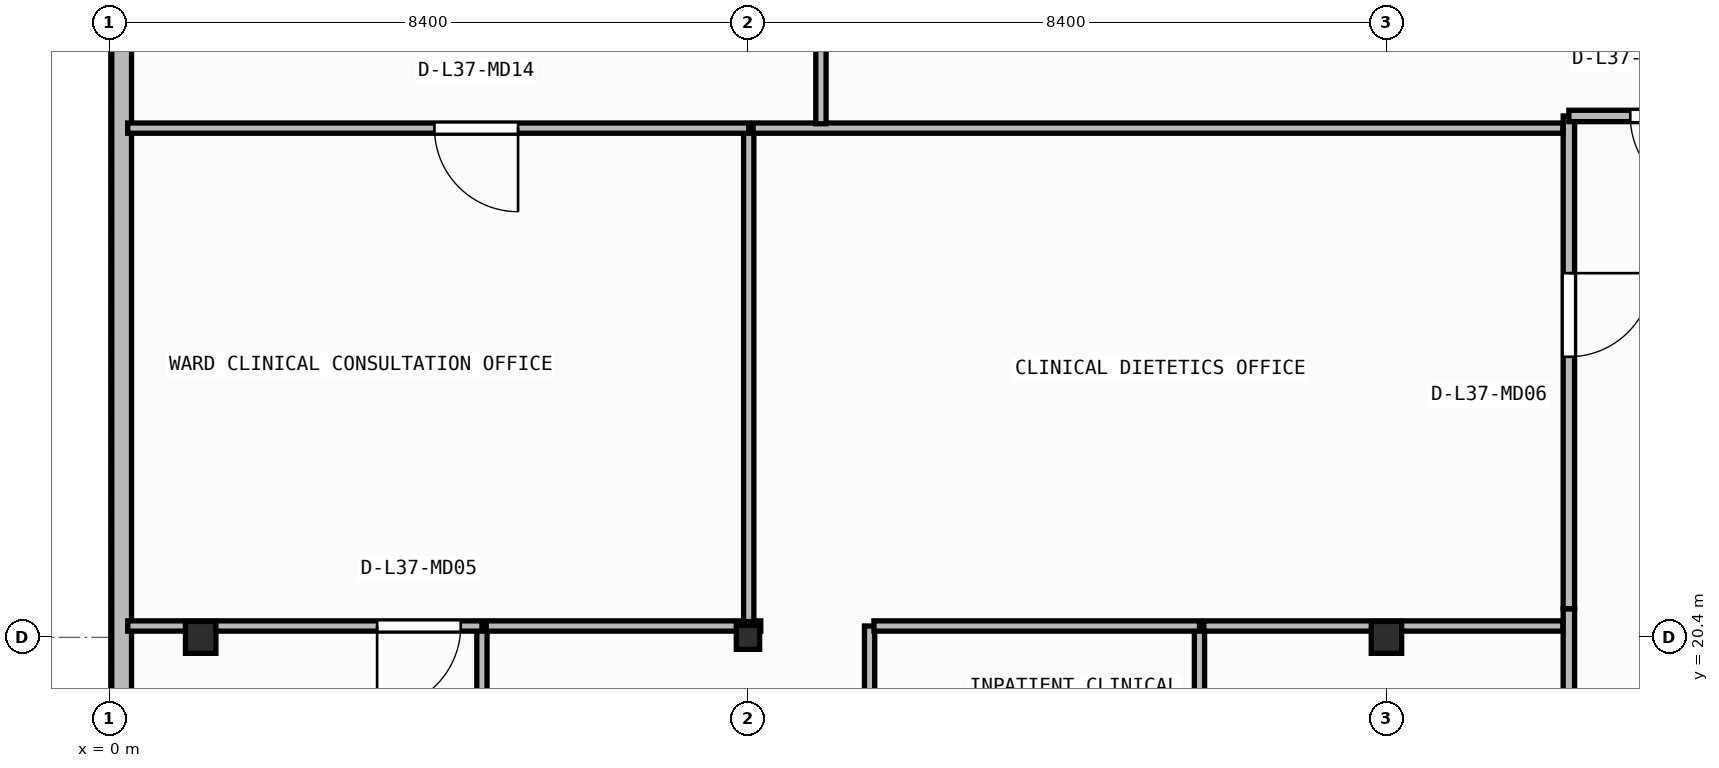
"""IFC4 building model, lengths in metres.
Left out: names, types, materials, properties, quantities, classifications, styles, units other than length and angle.
Written with IfcOpenShell. Run it as: python <this file> out.ifc"""

import sys

from ifc_helpers import new_model, si_unit, direction, frame, frame_2d, origin, origin_2d, place, context, subcontext, project, spatial, rectangle, i_section, extrude, element, fill, save


model = new_model("IFC4")
c1 = context("Model", 3, precision=1e-05, world=origin(), true_north=direction((0.0, 1.0)))
c2 = subcontext(c1, "Body", "Model", "MODEL_VIEW")
j1 = project(units=[si_unit("LENGTHUNIT", "METRE"), si_unit("PLANEANGLEUNIT", "RADIAN")], contexts=[c1])
p1 = place(None, origin())
s1 = spatial("IfcSite", under=j1, at=p1, CompositionType="ELEMENT")
p2 = place(p1, origin())
s2 = spatial("IfcBuilding", under=s1, at=p2, CompositionType="ELEMENT")
p3 = place(p2, frame((0.0, 0.0, 150.75)))
s3 = spatial("IfcBuildingStorey", under=s2, at=p3, CompositionType="ELEMENT", Elevation=150.75)
p4 = place(p3, frame((1.2, 20.4, 0.0), z_axis=(0.0, 0.0, 1.0), x_axis=(1.0, 0.0, 0.0)))
e1 = element("IfcColumn", 1, at=p4, inside=s3, PredefinedType="COLUMN", context=c2, shape_type="SweptSolid", body=[
    extrude(i_section(OverallWidth=0.4, OverallDepth=0.42, WebThickness=0.025, FlangeThickness=0.04, at=origin_2d()), origin(), (0.0, 0.0, 1.0), 3.95),
])
p5 = place(p3, frame((8.4, 20.4, 0.0), z_axis=(0.0, 0.0, 1.0), x_axis=(1.0, 0.0, 0.0)))
e2 = element("IfcColumn", 2, at=p5, inside=s3, PredefinedType="COLUMN", context=c2, shape_type="SweptSolid", body=[
    extrude(i_section(OverallWidth=0.307, OverallDepth=0.315, WebThickness=0.012, FlangeThickness=0.019, FilletRadius=0.017, at=origin_2d()), origin(), (0.0, 0.0, 1.0), 3.95),
])
p6 = place(p3, frame((16.8, 20.4, 0.0), z_axis=(0.0, 0.0, 1.0), x_axis=(1.0, 0.0, 0.0)))
e3 = element("IfcColumn", 3, at=p6, inside=s3, PredefinedType="COLUMN", context=c2, shape_type="SweptSolid", body=[
    extrude(i_section(OverallWidth=0.4, OverallDepth=0.42, WebThickness=0.025, FlangeThickness=0.04, at=origin_2d()), origin(), (0.0, 0.0, 1.0), 3.95),
])
p7 = place(p3, frame((0.16, 40.64, 0.0), z_axis=(0.0, 0.0, 1.0), x_axis=(0.0, -1.0, 0.0)))
e4 = element("IfcWall", 4, at=p7, inside=s3, PredefinedType="STANDARD", context=c2, shape_type="SweptSolid", body=[
    extrude(rectangle(XDim=37.88, YDim=0.26, at=frame_2d((18.94, 0.0))), origin(), (0.0, 0.0, 1.0), 3.71),
])
p8 = place(p7, frame((27.795, 0.0, 0.9)))
e5 = element("IfcOpeningElement", 5, at=p8, cuts=e4, PredefinedType="OPENING", context=c2, shape_type="SweptSolid", body=[
    extrude(rectangle(XDim=2.4, YDim=1.65, at=frame_2d((1.2, 0.825))), frame((0.0, 0.14, 0.0), z_axis=(0.0, -1.0, 0.0), x_axis=(1.0, 0.0, 0.0)), (0.0, 0.0, 1.0), 0.28),
])
p9 = place(p3, frame((19.2, 20.776, 0.0), z_axis=(0.0, 0.0, 1.0), x_axis=(0.0, -1.0, 0.0)))
e6 = element("IfcWall", 6, at=p9, inside=s3, PredefinedType="PARTITIONING", context=c2, shape_type="SweptSolid", body=[
    extrude(rectangle(XDim=6.076, YDim=0.15, at=frame_2d((3.038, 0.0))), origin(), (0.0, 0.0, 1.0), 3.71),
])
p10 = place(p3, frame((19.2, 27.26, 0.0), z_axis=(0.0, 0.0, 1.0), x_axis=(0.0, -1.0, 0.0)))
e7 = element("IfcWall", 7, at=p10, inside=s3, PredefinedType="PARTITIONING", context=c2, shape_type="SweptSolid", body=[
    extrude(rectangle(XDim=6.482, YDim=0.15, at=frame_2d((3.241, 0.0))), origin(), (0.0, 0.0, 1.0), 3.71),
])
p11 = place(p10, frame((2.068, 0.0, 0.0)))
e8 = element("IfcOpeningElement", 8, at=p11, cuts=e7, PredefinedType="OPENING", context=c2, shape_type="SweptSolid", body=[
    extrude(rectangle(XDim=1.1, YDim=2.1, at=frame_2d((0.55, 1.05))), frame((0.0, 0.085, 0.0), z_axis=(0.0, -1.0, 0.0), x_axis=(1.0, 0.0, 0.0)), (0.0, 0.0, 1.0), 0.17),
])
p12 = place(p3, frame((21.635, 27.26, 0.0), z_axis=(0.0, 0.0, 1.0), x_axis=(-1.0, 0.0, 0.0)))
e9 = element("IfcWall", 9, at=p12, inside=s3, PredefinedType="PARTITIONING", context=c2, shape_type="SweptSolid", body=[
    extrude(rectangle(XDim=2.435, YDim=0.15, at=frame_2d((1.218, 0.0))), origin(), (0.0, 0.0, 1.0), 3.71),
])
p13 = place(p12, frame((0.527, 0.0, 0.0)))
e10 = element("IfcOpeningElement", 10, at=p13, cuts=e9, PredefinedType="OPENING", context=c2, shape_type="SweptSolid", body=[
    extrude(rectangle(XDim=1.1, YDim=2.1, at=frame_2d((0.55, 1.05))), frame((0.0, 0.085, 0.0), z_axis=(0.0, -1.0, 0.0), x_axis=(1.0, 0.0, 0.0)), (0.0, 0.0, 1.0), 0.17),
])
p14 = place(p3, frame((4.9, 18.04, 0.0), z_axis=(0.0, 0.0, 1.0), x_axis=(0.0, 1.0, 0.0)))
e11 = element("IfcWall", 11, at=p14, inside=s3, PredefinedType="PARTITIONING", context=c2, shape_type="SweptSolid", body=[
    extrude(rectangle(XDim=2.51, YDim=0.135, at=frame_2d((1.255, 0.0))), origin(), (0.0, 0.0, 1.0), 3.71),
])
p15 = place(p3, frame((4.9, 20.55, 0.0), z_axis=(0.0, 0.0, 1.0), x_axis=(-1.0, 0.0, 0.0)))
e12 = element("IfcWall", 12, at=p15, inside=s3, PredefinedType="PARTITIONING", context=c2, shape_type="SweptSolid", body=[
    extrude(rectangle(XDim=4.66, YDim=0.135, at=frame_2d((2.33, 0.0))), origin(), (0.0, 0.0, 1.0), 3.083),
])
p16 = place(p15, frame((0.279, 0.0, 0.0)))
e13 = element("IfcOpeningElement", 13, at=p16, cuts=e12, PredefinedType="OPENING", context=c2, shape_type="SweptSolid", body=[
    extrude(rectangle(XDim=1.1, YDim=2.1, at=frame_2d((0.55, 1.05))), frame((0.0, 0.077, 0.0), z_axis=(0.0, -1.0, 0.0), x_axis=(1.0, 0.0, 0.0)), (0.0, 0.0, 1.0), 0.155),
])
p17 = place(p3, frame((10.0, 17.833, 0.0), z_axis=(0.0, 0.0, 1.0), x_axis=(0.0, 1.0, 0.0)))
e14 = element("IfcWall", 14, at=p17, inside=s3, PredefinedType="PARTITIONING", context=c2, shape_type="SweptSolid", body=[
    extrude(rectangle(XDim=2.718, YDim=0.135, at=frame_2d((1.359, 0.0))), origin(), (0.0, 0.0, 1.0), 3.71),
])
p18 = place(p3, frame((8.568, 20.55, 0.0), z_axis=(0.0, 0.0, 1.0), x_axis=(-1.0, 0.0, 0.0)))
e15 = element("IfcWall", 15, at=p18, inside=s3, PredefinedType="PARTITIONING", context=c2, shape_type="SweptSolid", body=[
    extrude(rectangle(XDim=3.611, YDim=0.135, at=frame_2d((1.805, 0.0))), origin(), (0.0, 0.0, 1.0), 3.083),
])
p19 = place(p3, frame((14.34, 17.833, 0.0), z_axis=(0.0, 0.0, 1.0), x_axis=(0.0, 1.0, 0.0)))
e16 = element("IfcWall", 16, at=p19, inside=s3, PredefinedType="PARTITIONING", context=c2, shape_type="SweptSolid", body=[
    extrude(rectangle(XDim=2.718, YDim=0.135, at=frame_2d((1.359, 0.0))), origin(), (0.0, 0.0, 1.0), 3.71),
])
p20 = place(p3, frame((14.34, 20.55, 0.0), z_axis=(0.0, 0.0, 1.0), x_axis=(-1.0, 0.0, 0.0)))
e17 = element("IfcWall", 17, at=p20, inside=s3, PredefinedType="PARTITIONING", context=c2, shape_type="SweptSolid", body=[
    extrude(rectangle(XDim=4.282, YDim=0.135, at=frame_2d((2.141, 0.0))), origin(), (0.0, 0.0, 1.0), 3.083),
])
p21 = place(p3, frame((19.12, 20.55, 0.0), z_axis=(0.0, 0.0, 1.0), x_axis=(-1.0, 0.0, 0.0)))
e18 = element("IfcWall", 18, at=p21, inside=s3, PredefinedType="PARTITIONING", context=c2, shape_type="SweptSolid", body=[
    extrude(rectangle(XDim=4.723, YDim=0.135, at=frame_2d((2.361, 0.0))), origin(), (0.0, 0.0, 1.0), 3.083),
])
p22 = place(p3, frame((8.41, 20.607, 0.0), z_axis=(0.0, 0.0, 1.0), x_axis=(0.0, 1.0, 0.0)))
e19 = element("IfcWall", 19, at=p22, inside=s3, PredefinedType="PARTITIONING", context=c2, shape_type="SweptSolid", body=[
    extrude(rectangle(XDim=6.493, YDim=0.135, at=frame_2d((3.246, 0.0))), origin(), (0.0, 0.0, 1.0), 3.152),
])
p23 = place(p3, frame((8.41, 27.1, 0.0), z_axis=(0.0, 0.0, 1.0), x_axis=(-1.0, 0.0, 0.0)))
e20 = element("IfcWall", 20, at=p23, inside=s3, PredefinedType="PARTITIONING", context=c2, shape_type="SweptSolid", body=[
    extrude(rectangle(XDim=8.17, YDim=0.135, at=frame_2d((4.085, 0.0))), origin(), (0.0, 0.0, 1.0), 3.71),
])
p24 = place(p23, frame((3.035, 0.0, 0.0)))
e21 = element("IfcOpeningElement", 21, at=p24, cuts=e20, PredefinedType="OPENING", context=c2, shape_type="SweptSolid", body=[
    extrude(rectangle(XDim=1.1, YDim=2.1, at=frame_2d((0.55, 1.05))), frame((0.0, 0.077, 0.0), z_axis=(0.0, -1.0, 0.0), x_axis=(1.0, 0.0, 0.0)), (0.0, 0.0, 1.0), 0.155),
])
p25 = place(p3, frame((19.12, 27.1, 0.0), z_axis=(0.0, 0.0, 1.0), x_axis=(-1.0, 0.0, 0.0)))
e22 = element("IfcWall", 22, at=p25, inside=s3, PredefinedType="PARTITIONING", context=c2, shape_type="SweptSolid", body=[
    extrude(rectangle(XDim=10.653, YDim=0.135, at=frame_2d((5.326, 0.0))), origin(), (0.0, 0.0, 1.0), 3.71),
])
p26 = place(p3, frame((9.36, 27.157, 0.0), z_axis=(0.0, 0.0, 1.0), x_axis=(0.0, 1.0, 0.0)))
e23 = element("IfcWall", 23, at=p26, inside=s3, PredefinedType="PARTITIONING", context=c2, shape_type="SweptSolid", body=[
    extrude(rectangle(XDim=11.572, YDim=0.135, at=frame_2d((5.786, 0.0))), origin(), (0.0, 0.0, 1.0), 3.71),
])
p27 = place(p11, origin())
e24 = element("IfcDoor", 24, at=p27, inside=s3, OperationType="SINGLE_SWING_LEFT", PredefinedType="DOOR", context=c2, shape_type="SweptSolid", body=[
    extrude(rectangle(XDim=1.1, YDim=2.1, at=frame_2d((0.55, 1.05))), frame((0.0, 0.025, 0.0), z_axis=(0.0, -1.0, 0.0), x_axis=(1.0, 0.0, 0.0)), (0.0, 0.0, 1.0), 0.05),
])
fill(e8, e24)
p28 = place(p13, origin())
e25 = element("IfcDoor", 25, at=p28, inside=s3, OperationType="SINGLE_SWING_LEFT", PredefinedType="DOOR", context=c2, shape_type="SweptSolid", body=[
    extrude(rectangle(XDim=1.1, YDim=2.1, at=frame_2d((0.55, 1.05))), frame((0.0, 0.025, 0.0), z_axis=(0.0, -1.0, 0.0), x_axis=(1.0, 0.0, 0.0)), (0.0, 0.0, 1.0), 0.05),
])
fill(e10, e25)
p29 = place(p16, origin())
e26 = element("IfcDoor", 26, at=p29, inside=s3, OperationType="SINGLE_SWING_RIGHT", PredefinedType="DOOR", context=c2, shape_type="SweptSolid", body=[
    extrude(rectangle(XDim=1.1, YDim=2.1, at=frame_2d((0.55, 1.05))), frame((0.0, 0.025, 0.0), z_axis=(0.0, -1.0, 0.0), x_axis=(1.0, 0.0, 0.0)), (0.0, 0.0, 1.0), 0.05),
])
fill(e13, e26)
p30 = place(p24, origin())
e27 = element("IfcDoor", 27, at=p30, inside=s3, OperationType="SINGLE_SWING_LEFT", PredefinedType="DOOR", context=c2, shape_type="SweptSolid", body=[
    extrude(rectangle(XDim=1.1, YDim=2.1, at=frame_2d((0.55, 1.05))), frame((0.0, 0.025, 0.0), z_axis=(0.0, -1.0, 0.0), x_axis=(1.0, 0.0, 0.0)), (0.0, 0.0, 1.0), 0.05),
])
fill(e21, e27)
save(model, sys.argv[1])
